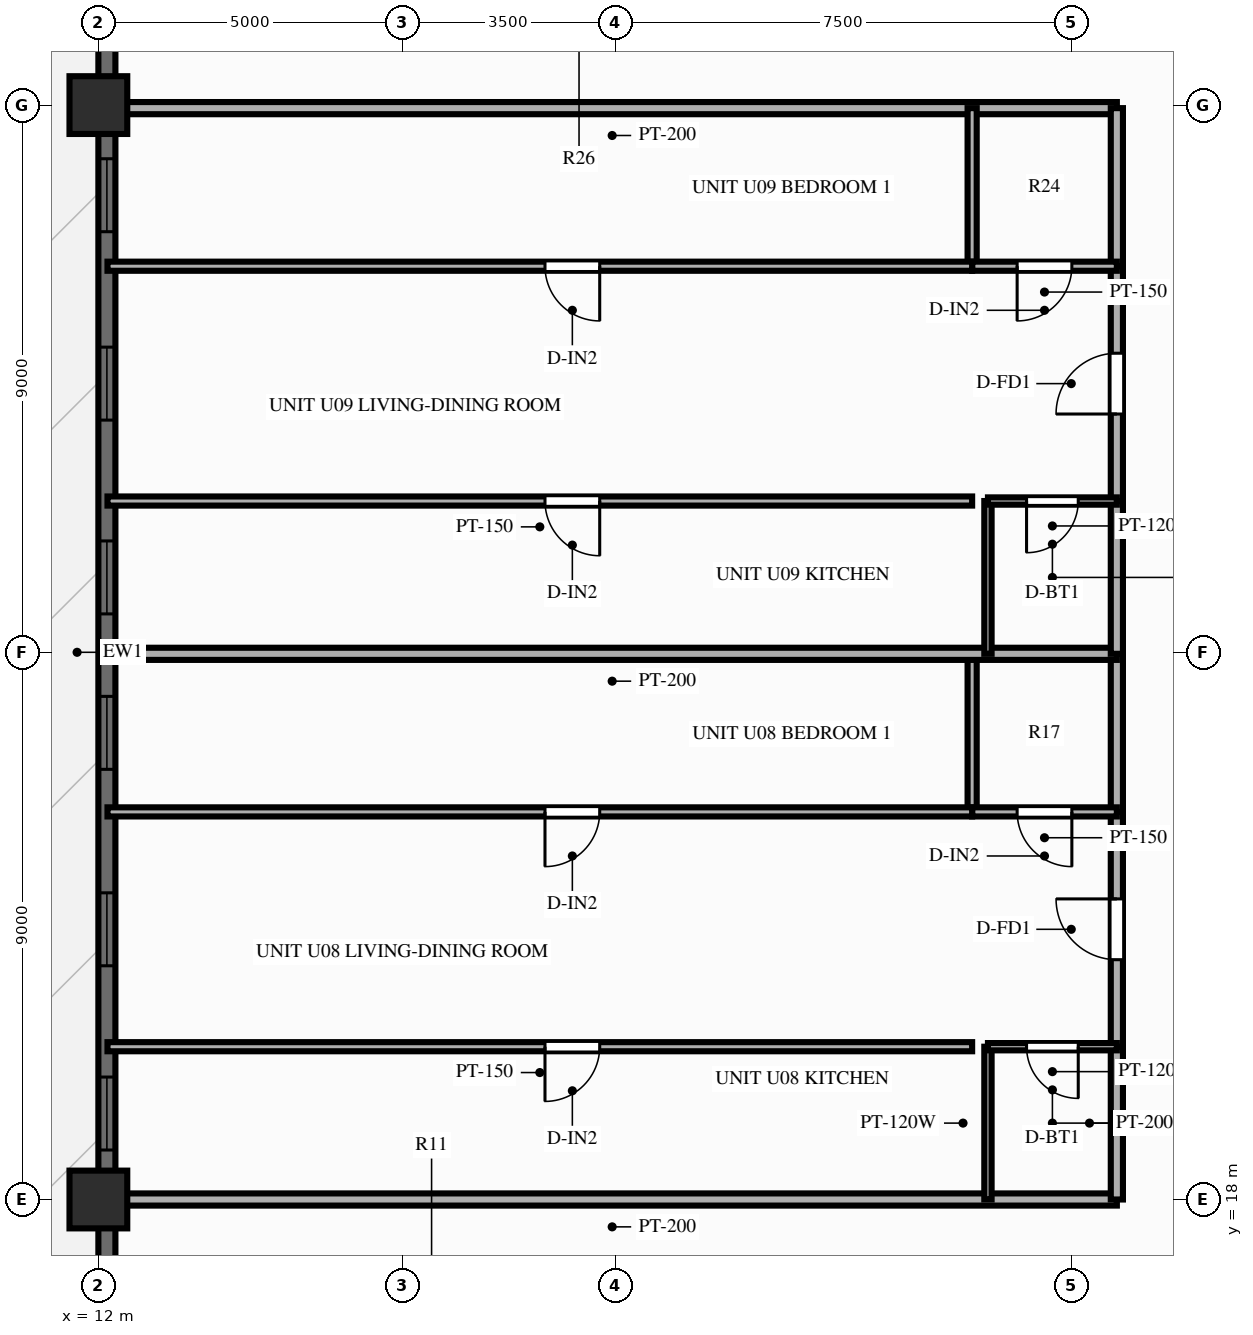
"""IFC4 building model, lengths in metres.
Left out: names, types, materials, properties, quantities, classifications, styles, units other than length and angle.
Written with IfcOpenShell. Run it as: python <this file> out.ifc"""

import sys

from ifc_helpers import new_model, si_unit, direction, frame, frame_2d, origin, origin_2d, place, context, subcontext, project, spatial, rectangle, extrude, source, transform, mapped, element, fill, save


model = new_model("IFC4")
c1 = context("Model", 3, precision=1e-05, world=origin(), true_north=direction((0.0, 1.0)))
c2 = subcontext(c1, "Body", "Model", "MODEL_VIEW")
j1 = project(units=[si_unit("LENGTHUNIT", "METRE"), si_unit("PLANEANGLEUNIT", "RADIAN")], contexts=[c1])
p1 = place(None, origin())
s1 = spatial("IfcSite", under=j1, at=p1, CompositionType="ELEMENT")
p2 = place(p1, origin())
s2 = spatial("IfcBuilding", under=s1, at=p2, CompositionType="ELEMENT")
p3 = place(p2, frame((0.0, 0.0, 83.85)))
s3 = spatial("IfcBuildingStorey", under=s2, at=p3, CompositionType="ELEMENT", Elevation=83.85)
m1 = source(origin(), c2, "Body", "SweptSolid", [
    extrude(rectangle(XDim=0.95, YDim=0.95, at=origin_2d()), origin(), (0.0, 0.0, 1.0), 3.0),
])
for number, where, z_axis, x_axis in (
    (1, (12.0, 36.0, 0.0), (0.0, 0.0, 1.0), (1.0, 0.0, 0.0)),
    (2, (12.0, 18.0, 0.0), (0.0, 0.0, 1.0), (1.0, 0.0, 0.0)),
):
    element("IfcColumn", number, at=place(p3, frame(where, z_axis=z_axis, x_axis=x_axis)), inside=s3, PredefinedType="COLUMN", context=c2, shape_type="MappedRepresentation", body=[
        mapped(m1, transform((0.0, 0.0, 0.0), scale=1.0)),
    ])
p4 = place(p3, frame((12.14, 7.2, 0.0), z_axis=(0.0, 0.0, 1.0), x_axis=(0.0, 1.0, 0.0)))
e3 = element("IfcWall", 3, at=p4, inside=s3, PredefinedType="SOLIDWALL", context=c2, shape_type="SweptSolid", body=[
    extrude(rectangle(XDim=39.6, YDim=0.28, at=frame_2d((19.8, 0.0))), origin(), (0.0, 0.0, 1.0), 2.28),
])
p5 = place(p4, frame((4.6, 0.0, 0.0)))
e4 = element("IfcOpeningElement", 4, at=p5, cuts=e3, PredefinedType="OPENING", context=c2, shape_type="SweptSolid", body=[
    extrude(rectangle(XDim=1.6, YDim=2.15, at=frame_2d((0.8, 1.075))), frame((0.0, 0.152, 0.0), z_axis=(0.0, -1.0, 0.0), x_axis=(1.0, 0.0, 0.0)), (0.0, 0.0, 1.0), 0.304),
])
p6 = place(p4, frame((11.614, 0.0, 0.25)))
e5 = element("IfcOpeningElement", 5, at=p6, cuts=e3, PredefinedType="OPENING", context=c2, shape_type="SweptSolid", body=[
    extrude(rectangle(XDim=1.2, YDim=1.5, at=frame_2d((0.6, 0.75))), frame((0.0, 0.152, 0.0), z_axis=(0.0, -1.0, 0.0), x_axis=(1.0, 0.0, 0.0)), (0.0, 0.0, 1.0), 0.304),
])
p7 = place(p4, frame((14.644, 0.0, 0.25)))
e6 = element("IfcOpeningElement", 6, at=p7, cuts=e3, PredefinedType="OPENING", context=c2, shape_type="SweptSolid", body=[
    extrude(rectangle(XDim=1.2, YDim=1.5, at=frame_2d((0.6, 0.75))), frame((0.0, 0.152, 0.0), z_axis=(0.0, -1.0, 0.0), x_axis=(1.0, 0.0, 0.0)), (0.0, 0.0, 1.0), 0.304),
])
p8 = place(p4, frame((17.875, 0.0, 0.25)))
e7 = element("IfcOpeningElement", 7, at=p8, cuts=e3, PredefinedType="OPENING", context=c2, shape_type="SweptSolid", body=[
    extrude(rectangle(XDim=1.2, YDim=1.5, at=frame_2d((0.6, 0.75))), frame((0.0, 0.152, 0.0), z_axis=(0.0, -1.0, 0.0), x_axis=(1.0, 0.0, 0.0)), (0.0, 0.0, 1.0), 0.304),
])
p9 = place(p4, frame((20.431, 0.0, 0.25)))
e8 = element("IfcOpeningElement", 8, at=p9, cuts=e3, PredefinedType="OPENING", context=c2, shape_type="SweptSolid", body=[
    extrude(rectangle(XDim=1.2, YDim=1.5, at=frame_2d((0.6, 0.75))), frame((0.0, 0.152, 0.0), z_axis=(0.0, -1.0, 0.0), x_axis=(1.0, 0.0, 0.0)), (0.0, 0.0, 1.0), 0.304),
])
p10 = place(p4, frame((23.619, 0.0, 0.25)))
e9 = element("IfcOpeningElement", 9, at=p10, cuts=e3, PredefinedType="OPENING", context=c2, shape_type="SweptSolid", body=[
    extrude(rectangle(XDim=1.2, YDim=1.5, at=frame_2d((0.6, 0.75))), frame((0.0, 0.152, 0.0), z_axis=(0.0, -1.0, 0.0), x_axis=(1.0, 0.0, 0.0)), (0.0, 0.0, 1.0), 0.304),
])
p11 = place(p4, frame((26.718, 0.0, 0.25)))
e10 = element("IfcOpeningElement", 10, at=p11, cuts=e3, PredefinedType="OPENING", context=c2, shape_type="SweptSolid", body=[
    extrude(rectangle(XDim=1.2, YDim=1.5, at=frame_2d((0.6, 0.75))), frame((0.0, 0.152, 0.0), z_axis=(0.0, -1.0, 0.0), x_axis=(1.0, 0.0, 0.0)), (0.0, 0.0, 1.0), 0.304),
])
p12 = place(p4, frame((33.6, 0.0, 0.25)))
e11 = element("IfcOpeningElement", 11, at=p12, cuts=e3, PredefinedType="OPENING", context=c2, shape_type="SweptSolid", body=[
    extrude(rectangle(XDim=1.2, YDim=1.5, at=frame_2d((0.6, 0.75))), frame((0.0, 0.152, 0.0), z_axis=(0.0, -1.0, 0.0), x_axis=(1.0, 0.0, 0.0)), (0.0, 0.0, 1.0), 0.304),
])
for number, where, z_axis, x_axis in (
    (12, (28.75, 18.0, 0.0), (0.0, 0.0, 1.0), (-1.0, 0.0, 0.0)),
    (13, (28.75, 35.95, 0.0), (0.0, 0.0, 1.0), (-1.0, 0.0, 0.0)),
):
    element("IfcWall", number, at=place(p3, frame(where, z_axis=z_axis, x_axis=x_axis)), inside=s3, PredefinedType="PARTITIONING", context=c2, shape_type="SweptSolid", body=[
        extrude(rectangle(XDim=16.6, YDim=0.2, at=frame_2d((8.3, 0.0))), origin(), (0.0, 0.0, 1.0), 2.34),
    ])
p13 = place(p3, frame((28.75, 18.0, 0.0), z_axis=(0.0, 0.0, 1.0), x_axis=(0.0, 1.0, 0.0)))
e14 = element("IfcWall", 14, at=p13, inside=s3, PredefinedType="PARTITIONING", context=c2, shape_type="SweptSolid", body=[
    extrude(rectangle(XDim=2.513, YDim=0.2, at=frame_2d((1.256, 0.0))), origin(), (0.0, 0.0, 1.0), 2.79),
])
p14 = place(p3, frame((28.75, 20.513, 0.0), z_axis=(0.0, 0.0, 1.0), x_axis=(0.0, 1.0, 0.0)))
e15 = element("IfcWall", 15, at=p14, inside=s3, PredefinedType="PARTITIONING", context=c2, shape_type="SweptSolid", body=[
    extrude(rectangle(XDim=3.862, YDim=0.2, at=frame_2d((1.931, 0.0))), origin(), (0.0, 0.0, 1.0), 2.79),
])
p15 = place(p14, frame((1.431, 0.0, 0.0)))
e16 = element("IfcOpeningElement", 16, at=p15, cuts=e15, PredefinedType="OPENING", context=c2, shape_type="SweptSolid", body=[
    extrude(rectangle(XDim=1.0, YDim=2.15, at=frame_2d((0.5, 1.075))), frame((0.0, 0.112, 0.0), z_axis=(0.0, -1.0, 0.0), x_axis=(1.0, 0.0, 0.0)), (0.0, 0.0, 1.0), 0.224),
])
p16 = place(p3, frame((28.75, 24.375, 0.0), z_axis=(0.0, 0.0, 1.0), x_axis=(0.0, 1.0, 0.0)))
e17 = element("IfcWall", 17, at=p16, inside=s3, PredefinedType="PARTITIONING", context=c2, shape_type="SweptSolid", body=[
    extrude(rectangle(XDim=2.6, YDim=0.2, at=frame_2d((1.3, 0.0))), origin(), (0.0, 0.0, 1.0), 2.79),
])
p17 = place(p3, frame((26.63, 18.0, 0.0), z_axis=(0.0, 0.0, 1.0), x_axis=(0.0, 1.0, 0.0)))
e18 = element("IfcWall", 18, at=p17, inside=s3, PredefinedType="PARTITIONING", context=c2, shape_type="SweptSolid", body=[
    extrude(rectangle(XDim=2.513, YDim=0.12, at=frame_2d((1.256, 0.0))), origin(), (0.0, 0.0, 1.0), 2.79),
])
p18 = place(p3, frame((26.37, 24.375, 0.0), z_axis=(0.0, 0.0, 1.0), x_axis=(0.0, 1.0, 0.0)))
e19 = element("IfcWall", 19, at=p18, inside=s3, PredefinedType="PARTITIONING", context=c2, shape_type="SweptSolid", body=[
    extrude(rectangle(XDim=2.6, YDim=0.15, at=frame_2d((1.3, 0.0))), origin(), (0.0, 0.0, 1.0), 2.79),
])
p19 = place(p3, frame((28.75, 20.513, 0.0), z_axis=(0.0, 0.0, 1.0), x_axis=(-1.0, 0.0, 0.0)))
e20 = element("IfcWall", 20, at=p19, inside=s3, PredefinedType="PARTITIONING", context=c2, shape_type="SweptSolid", body=[
    extrude(rectangle(XDim=2.12, YDim=0.12, at=frame_2d((1.06, 0.0))), origin(), (0.0, 0.0, 1.0), 2.79),
])
p20 = place(p19, frame((0.635, 0.0, 0.0)))
e21 = element("IfcOpeningElement", 21, at=p20, cuts=e20, PredefinedType="OPENING", context=c2, shape_type="SweptSolid", body=[
    extrude(rectangle(XDim=0.85, YDim=2.05, at=frame_2d((0.425, 1.025))), frame((0.0, 0.072, 0.0), z_axis=(0.0, -1.0, 0.0), x_axis=(1.0, 0.0, 0.0)), (0.0, 0.0, 1.0), 0.144),
])
p21 = place(p3, frame((26.37, 20.513, 0.0), z_axis=(0.0, 0.0, 1.0), x_axis=(-1.0, 0.0, 0.0)))
e22 = element("IfcWall", 22, at=p21, inside=s3, PredefinedType="PARTITIONING", context=c2, shape_type="SweptSolid", body=[
    extrude(rectangle(XDim=14.22, YDim=0.15, at=frame_2d((7.11, 0.0))), origin(), (0.0, 0.0, 1.0), 2.79),
])
p22 = place(p21, frame((6.125, 0.0, 0.0)))
e23 = element("IfcOpeningElement", 23, at=p22, cuts=e22, PredefinedType="OPENING", context=c2, shape_type="SweptSolid", body=[
    extrude(rectangle(XDim=0.9, YDim=2.1, at=frame_2d((0.45, 1.05))), frame((0.0, 0.087, 0.0), z_axis=(0.0, -1.0, 0.0), x_axis=(1.0, 0.0, 0.0)), (0.0, 0.0, 1.0), 0.174),
])
p23 = place(p3, frame((28.75, 24.375, 0.0), z_axis=(0.0, 0.0, 1.0), x_axis=(-1.0, 0.0, 0.0)))
e24 = element("IfcWall", 24, at=p23, inside=s3, PredefinedType="PARTITIONING", context=c2, shape_type="SweptSolid", body=[
    extrude(rectangle(XDim=2.38, YDim=0.15, at=frame_2d((1.19, 0.0))), origin(), (0.0, 0.0, 1.0), 2.79),
])
p24 = place(p23, frame((0.74, 0.0, 0.0)))
e25 = element("IfcOpeningElement", 25, at=p24, cuts=e24, PredefinedType="OPENING", context=c2, shape_type="SweptSolid", body=[
    extrude(rectangle(XDim=0.9, YDim=2.1, at=frame_2d((0.45, 1.05))), frame((0.0, 0.087, 0.0), z_axis=(0.0, -1.0, 0.0), x_axis=(1.0, 0.0, 0.0)), (0.0, 0.0, 1.0), 0.174),
])
p25 = place(p3, frame((26.37, 24.375, 0.0), z_axis=(0.0, 0.0, 1.0), x_axis=(-1.0, 0.0, 0.0)))
e26 = element("IfcWall", 26, at=p25, inside=s3, PredefinedType="PARTITIONING", context=c2, shape_type="SweptSolid", body=[
    extrude(rectangle(XDim=14.22, YDim=0.15, at=frame_2d((7.11, 0.0))), origin(), (0.0, 0.0, 1.0), 2.79),
])
p26 = place(p25, frame((6.125, 0.0, 0.0)))
e27 = element("IfcOpeningElement", 27, at=p26, cuts=e26, PredefinedType="OPENING", context=c2, shape_type="SweptSolid", body=[
    extrude(rectangle(XDim=0.9, YDim=2.1, at=frame_2d((0.45, 1.05))), frame((0.0, 0.087, 0.0), z_axis=(0.0, -1.0, 0.0), x_axis=(1.0, 0.0, 0.0)), (0.0, 0.0, 1.0), 0.174),
])
p27 = place(p3, frame((28.75, 26.975, 0.0), z_axis=(0.0, 0.0, 1.0), x_axis=(-1.0, 0.0, 0.0)))
e28 = element("IfcWall", 28, at=p27, inside=s3, PredefinedType="PARTITIONING", context=c2, shape_type="SweptSolid", body=[
    extrude(rectangle(XDim=16.6, YDim=0.2, at=frame_2d((8.3, 0.0))), origin(), (0.0, 0.0, 1.0), 2.79),
])
p28 = place(p3, frame((28.75, 26.975, 0.0), z_axis=(0.0, 0.0, 1.0), x_axis=(0.0, 1.0, 0.0)))
e29 = element("IfcWall", 29, at=p28, inside=s3, PredefinedType="PARTITIONING", context=c2, shape_type="SweptSolid", body=[
    extrude(rectangle(XDim=2.513, YDim=0.2, at=frame_2d((1.256, 0.0))), origin(), (0.0, 0.0, 1.0), 2.79),
])
p29 = place(p3, frame((28.75, 29.488, 0.0), z_axis=(0.0, 0.0, 1.0), x_axis=(0.0, 1.0, 0.0)))
e30 = element("IfcWall", 30, at=p29, inside=s3, PredefinedType="PARTITIONING", context=c2, shape_type="SweptSolid", body=[
    extrude(rectangle(XDim=3.862, YDim=0.2, at=frame_2d((1.931, 0.0))), origin(), (0.0, 0.0, 1.0), 2.79),
])
p30 = place(p29, frame((1.431, 0.0, 0.0)))
e31 = element("IfcOpeningElement", 31, at=p30, cuts=e30, PredefinedType="OPENING", context=c2, shape_type="SweptSolid", body=[
    extrude(rectangle(XDim=1.0, YDim=2.15, at=frame_2d((0.5, 1.075))), frame((0.0, 0.112, 0.0), z_axis=(0.0, -1.0, 0.0), x_axis=(1.0, 0.0, 0.0)), (0.0, 0.0, 1.0), 0.224),
])
p31 = place(p3, frame((28.75, 33.35, 0.0), z_axis=(0.0, 0.0, 1.0), x_axis=(0.0, 1.0, 0.0)))
e32 = element("IfcWall", 32, at=p31, inside=s3, PredefinedType="PARTITIONING", context=c2, shape_type="SweptSolid", body=[
    extrude(rectangle(XDim=2.6, YDim=0.2, at=frame_2d((1.3, 0.0))), origin(), (0.0, 0.0, 1.0), 2.79),
])
p32 = place(p3, frame((26.63, 26.975, 0.0), z_axis=(0.0, 0.0, 1.0), x_axis=(0.0, 1.0, 0.0)))
e33 = element("IfcWall", 33, at=p32, inside=s3, PredefinedType="PARTITIONING", context=c2, shape_type="SweptSolid", body=[
    extrude(rectangle(XDim=2.513, YDim=0.12, at=frame_2d((1.256, 0.0))), origin(), (0.0, 0.0, 1.0), 2.79),
])
p33 = place(p3, frame((26.37, 33.35, 0.0), z_axis=(0.0, 0.0, 1.0), x_axis=(0.0, 1.0, 0.0)))
e34 = element("IfcWall", 34, at=p33, inside=s3, PredefinedType="PARTITIONING", context=c2, shape_type="SweptSolid", body=[
    extrude(rectangle(XDim=2.6, YDim=0.15, at=frame_2d((1.3, 0.0))), origin(), (0.0, 0.0, 1.0), 2.79),
])
p34 = place(p3, frame((28.75, 29.488, 0.0), z_axis=(0.0, 0.0, 1.0), x_axis=(-1.0, 0.0, 0.0)))
e35 = element("IfcWall", 35, at=p34, inside=s3, PredefinedType="PARTITIONING", context=c2, shape_type="SweptSolid", body=[
    extrude(rectangle(XDim=2.12, YDim=0.12, at=frame_2d((1.06, 0.0))), origin(), (0.0, 0.0, 1.0), 2.79),
])
p35 = place(p34, frame((0.635, 0.0, 0.0)))
e36 = element("IfcOpeningElement", 36, at=p35, cuts=e35, PredefinedType="OPENING", context=c2, shape_type="SweptSolid", body=[
    extrude(rectangle(XDim=0.85, YDim=2.05, at=frame_2d((0.425, 1.025))), frame((0.0, 0.072, 0.0), z_axis=(0.0, -1.0, 0.0), x_axis=(1.0, 0.0, 0.0)), (0.0, 0.0, 1.0), 0.144),
])
p36 = place(p3, frame((26.37, 29.488, 0.0), z_axis=(0.0, 0.0, 1.0), x_axis=(-1.0, 0.0, 0.0)))
e37 = element("IfcWall", 37, at=p36, inside=s3, PredefinedType="PARTITIONING", context=c2, shape_type="SweptSolid", body=[
    extrude(rectangle(XDim=14.22, YDim=0.15, at=frame_2d((7.11, 0.0))), origin(), (0.0, 0.0, 1.0), 2.79),
])
p37 = place(p36, frame((6.125, 0.0, 0.0)))
e38 = element("IfcOpeningElement", 38, at=p37, cuts=e37, PredefinedType="OPENING", context=c2, shape_type="SweptSolid", body=[
    extrude(rectangle(XDim=0.9, YDim=2.1, at=frame_2d((0.45, 1.05))), frame((0.0, 0.087, 0.0), z_axis=(0.0, -1.0, 0.0), x_axis=(1.0, 0.0, 0.0)), (0.0, 0.0, 1.0), 0.174),
])
p38 = place(p3, frame((28.75, 33.35, 0.0), z_axis=(0.0, 0.0, 1.0), x_axis=(-1.0, 0.0, 0.0)))
e39 = element("IfcWall", 39, at=p38, inside=s3, PredefinedType="PARTITIONING", context=c2, shape_type="SweptSolid", body=[
    extrude(rectangle(XDim=2.38, YDim=0.15, at=frame_2d((1.19, 0.0))), origin(), (0.0, 0.0, 1.0), 2.79),
])
p39 = place(p38, frame((0.74, 0.0, 0.0)))
e40 = element("IfcOpeningElement", 40, at=p39, cuts=e39, PredefinedType="OPENING", context=c2, shape_type="SweptSolid", body=[
    extrude(rectangle(XDim=0.9, YDim=2.1, at=frame_2d((0.45, 1.05))), frame((0.0, 0.087, 0.0), z_axis=(0.0, -1.0, 0.0), x_axis=(1.0, 0.0, 0.0)), (0.0, 0.0, 1.0), 0.174),
])
p40 = place(p3, frame((26.37, 33.35, 0.0), z_axis=(0.0, 0.0, 1.0), x_axis=(-1.0, 0.0, 0.0)))
e41 = element("IfcWall", 41, at=p40, inside=s3, PredefinedType="PARTITIONING", context=c2, shape_type="SweptSolid", body=[
    extrude(rectangle(XDim=14.22, YDim=0.15, at=frame_2d((7.11, 0.0))), origin(), (0.0, 0.0, 1.0), 2.79),
])
p41 = place(p40, frame((6.125, 0.0, 0.0)))
e42 = element("IfcOpeningElement", 42, at=p41, cuts=e41, PredefinedType="OPENING", context=c2, shape_type="SweptSolid", body=[
    extrude(rectangle(XDim=0.9, YDim=2.1, at=frame_2d((0.45, 1.05))), frame((0.0, 0.087, 0.0), z_axis=(0.0, -1.0, 0.0), x_axis=(1.0, 0.0, 0.0)), (0.0, 0.0, 1.0), 0.174),
])
m2 = source(origin(), c2, "Body", "SweptSolid", [
    extrude(rectangle(XDim=1.2, YDim=1.5, at=frame_2d((0.6, 0.75))), frame((0.0, 0.03, 0.0), z_axis=(0.0, -1.0, 0.0), x_axis=(1.0, 0.0, 0.0)), (0.0, 0.0, 1.0), 0.06),
])
p42 = place(p6, origin())
e43 = element("IfcWindow", 43, at=p42, inside=s3, PartitioningType="SINGLE_PANEL", PredefinedType="WINDOW", context=c2, shape_type="MappedRepresentation", body=[
    mapped(m2, transform((0.0, 0.0, 0.0), scale=1.0)),
])
fill(e5, e43)
p43 = place(p7, origin())
e44 = element("IfcWindow", 44, at=p43, inside=s3, PartitioningType="SINGLE_PANEL", PredefinedType="WINDOW", context=c2, shape_type="MappedRepresentation", body=[
    mapped(m2, transform((0.0, 0.0, 0.0), scale=1.0)),
])
fill(e6, e44)
p44 = place(p8, origin())
e45 = element("IfcWindow", 45, at=p44, inside=s3, PartitioningType="SINGLE_PANEL", PredefinedType="WINDOW", context=c2, shape_type="MappedRepresentation", body=[
    mapped(m2, transform((0.0, 0.0, 0.0), scale=1.0)),
])
fill(e7, e45)
p45 = place(p9, origin())
e46 = element("IfcWindow", 46, at=p45, inside=s3, PartitioningType="SINGLE_PANEL", PredefinedType="WINDOW", context=c2, shape_type="MappedRepresentation", body=[
    mapped(m2, transform((0.0, 0.0, 0.0), scale=1.0)),
])
fill(e8, e46)
p46 = place(p10, origin())
e47 = element("IfcWindow", 47, at=p46, inside=s3, PartitioningType="SINGLE_PANEL", PredefinedType="WINDOW", context=c2, shape_type="MappedRepresentation", body=[
    mapped(m2, transform((0.0, 0.0, 0.0), scale=1.0)),
])
fill(e9, e47)
p47 = place(p11, origin())
e48 = element("IfcWindow", 48, at=p47, inside=s3, PartitioningType="SINGLE_PANEL", PredefinedType="WINDOW", context=c2, shape_type="MappedRepresentation", body=[
    mapped(m2, transform((0.0, 0.0, 0.0), scale=1.0)),
])
fill(e10, e48)
m3 = source(origin(), c2, "Body", "SweptSolid", [
    extrude(rectangle(XDim=1.0, YDim=2.15, at=frame_2d((0.5, 1.075))), frame((0.0, 0.025, 0.0), z_axis=(0.0, -1.0, 0.0), x_axis=(1.0, 0.0, 0.0)), (0.0, 0.0, 1.0), 0.05),
])
p48 = place(p15, origin())
e49 = element("IfcDoor", 49, at=p48, inside=s3, OperationType="SINGLE_SWING_RIGHT", PredefinedType="DOOR", context=c2, shape_type="MappedRepresentation", body=[
    mapped(m3, transform((0.0, 0.0, 0.0), scale=1.0)),
])
fill(e16, e49)
m4 = source(origin(), c2, "Body", "SweptSolid", [
    extrude(rectangle(XDim=0.85, YDim=2.05, at=frame_2d((0.425, 1.025))), frame((0.0, 0.025, 0.0), z_axis=(0.0, -1.0, 0.0), x_axis=(1.0, 0.0, 0.0)), (0.0, 0.0, 1.0), 0.05),
])
p49 = place(p20, origin())
e50 = element("IfcDoor", 50, at=p49, inside=s3, OperationType="SINGLE_SWING_LEFT", PredefinedType="DOOR", context=c2, shape_type="MappedRepresentation", body=[
    mapped(m4, transform((0.0, 0.0, 0.0), scale=1.0)),
])
fill(e21, e50)
m5 = source(origin(), c2, "Body", "SweptSolid", [
    extrude(rectangle(XDim=0.9, YDim=2.1, at=frame_2d((0.45, 1.05))), frame((0.0, 0.025, 0.0), z_axis=(0.0, -1.0, 0.0), x_axis=(1.0, 0.0, 0.0)), (0.0, 0.0, 1.0), 0.05),
])
p50 = place(p22, origin())
e51 = element("IfcDoor", 51, at=p50, inside=s3, OperationType="SINGLE_SWING_RIGHT", PredefinedType="DOOR", context=c2, shape_type="MappedRepresentation", body=[
    mapped(m5, transform((0.0, 0.0, 0.0), scale=1.0)),
])
fill(e23, e51)
p51 = place(p24, origin())
e52 = element("IfcDoor", 52, at=p51, inside=s3, OperationType="SINGLE_SWING_LEFT", PredefinedType="DOOR", context=c2, shape_type="MappedRepresentation", body=[
    mapped(m5, transform((0.0, 0.0, 0.0), scale=1.0)),
])
fill(e25, e52)
p52 = place(p26, origin())
e53 = element("IfcDoor", 53, at=p52, inside=s3, OperationType="SINGLE_SWING_RIGHT", PredefinedType="DOOR", context=c2, shape_type="MappedRepresentation", body=[
    mapped(m5, transform((0.0, 0.0, 0.0), scale=1.0)),
])
fill(e27, e53)
p53 = place(p30, origin())
e54 = element("IfcDoor", 54, at=p53, inside=s3, OperationType="SINGLE_SWING_LEFT", PredefinedType="DOOR", context=c2, shape_type="MappedRepresentation", body=[
    mapped(m3, transform((0.0, 0.0, 0.0), scale=1.0)),
])
fill(e31, e54)
p54 = place(p35, origin())
e55 = element("IfcDoor", 55, at=p54, inside=s3, OperationType="SINGLE_SWING_RIGHT", PredefinedType="DOOR", context=c2, shape_type="MappedRepresentation", body=[
    mapped(m4, transform((0.0, 0.0, 0.0), scale=1.0)),
])
fill(e36, e55)
p55 = place(p37, origin())
e56 = element("IfcDoor", 56, at=p55, inside=s3, OperationType="SINGLE_SWING_LEFT", PredefinedType="DOOR", context=c2, shape_type="MappedRepresentation", body=[
    mapped(m5, transform((0.0, 0.0, 0.0), scale=1.0)),
])
fill(e38, e56)
p56 = place(p39, origin())
e57 = element("IfcDoor", 57, at=p56, inside=s3, OperationType="SINGLE_SWING_RIGHT", PredefinedType="DOOR", context=c2, shape_type="MappedRepresentation", body=[
    mapped(m5, transform((0.0, 0.0, 0.0), scale=1.0)),
])
fill(e40, e57)
p57 = place(p41, origin())
e58 = element("IfcDoor", 58, at=p57, inside=s3, OperationType="SINGLE_SWING_LEFT", PredefinedType="DOOR", context=c2, shape_type="MappedRepresentation", body=[
    mapped(m5, transform((0.0, 0.0, 0.0), scale=1.0)),
])
fill(e42, e58)
save(model, sys.argv[1])
